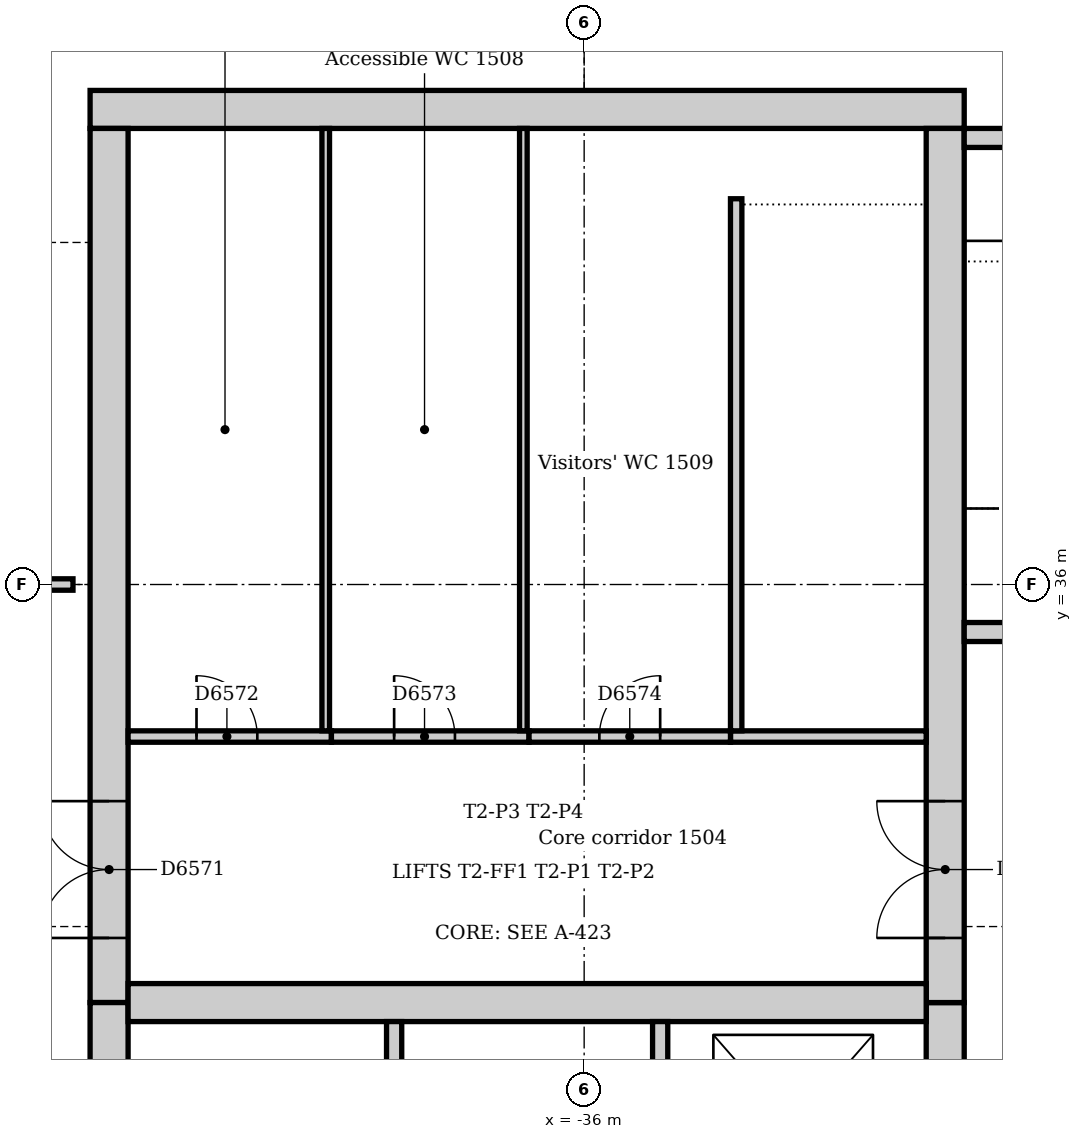
"""IFC4 building model, lengths in metres.
Left out: names, types, materials, properties, quantities, classifications, styles, units other than length and angle.
Written with IfcOpenShell. Run it as: python <this file> out.ifc"""

import sys

from ifc_helpers import new_model, si_unit, direction, frame, frame_2d, origin, place, context, subcontext, project, spatial, rectangle, extrude, element, fill, save


model = new_model("IFC4")
c1 = context("Model", 3, precision=1e-05, world=origin(), true_north=direction((0.0, 1.0)))
c2 = subcontext(c1, "Body", "Model", "MODEL_VIEW")
j1 = project(units=[si_unit("LENGTHUNIT", "METRE"), si_unit("PLANEANGLEUNIT", "RADIAN")], contexts=[c1])
p1 = place(None, origin())
s1 = spatial("IfcSite", under=j1, at=p1, CompositionType="ELEMENT")
p2 = place(p1, origin())
s2 = spatial("IfcBuilding", under=s1, at=p2, CompositionType="ELEMENT")
p3 = place(p2, frame((0.0, 0.0, 67.0)))
s3 = spatial("IfcBuildingStorey", under=s2, at=p3, CompositionType="ELEMENT", Elevation=67.0)
p4 = place(p3, frame((-31.0, 42.25, 0.0), z_axis=(0.0, 0.0, 1.0), x_axis=(-1.0, 0.0, 0.0)))
e1 = element("IfcWall", 1, at=p4, inside=s3, PredefinedType="SOLIDWALL", context=c2, shape_type="SweptSolid", body=[
    extrude(rectangle(XDim=11.5, YDim=0.5, at=frame_2d((5.75, 0.0))), origin(), (0.0, 0.0, 1.0), 4.0),
])
p5 = place(p3, frame((-31.25, 21.0, 0.0), z_axis=(0.0, 0.0, 1.0), x_axis=(0.0, 1.0, 0.0)))
e2 = element("IfcWall", 2, at=p5, inside=s3, PredefinedType="SOLIDWALL", context=c2, shape_type="SweptSolid", body=[
    extrude(rectangle(XDim=9.5, YDim=0.5, at=frame_2d((4.75, 0.0))), origin(), (0.0, 0.0, 1.0), 4.0),
])
p6 = place(p5, frame((5.25, 0.0, 0.0)))
e3 = element("IfcOpeningElement", 3, at=p6, cuts=e2, PredefinedType="OPENING", context=c2, shape_type="SweptSolid", body=[
    extrude(rectangle(XDim=1.0, YDim=2.1, at=frame_2d((0.5, 1.05))), frame((0.0, 0.26, 0.0), z_axis=(0.0, -1.0, 0.0), x_axis=(1.0, 0.0, 0.0)), (0.0, 0.0, 1.0), 0.52),
])
p7 = place(p3, frame((-31.25, 30.5, 0.0), z_axis=(0.0, 0.0, 1.0), x_axis=(0.0, 1.0, 0.0)))
e4 = element("IfcWall", 4, at=p7, inside=s3, PredefinedType="SOLIDWALL", context=c2, shape_type="SweptSolid", body=[
    extrude(rectangle(XDim=11.5, YDim=0.5, at=frame_2d((5.75, 0.0))), origin(), (0.0, 0.0, 1.0), 4.0),
])
p8 = place(p7, frame((0.85, 0.0, 0.0)))
e5 = element("IfcOpeningElement", 5, at=p8, cuts=e4, PredefinedType="OPENING", context=c2, shape_type="SweptSolid", body=[
    extrude(rectangle(XDim=1.8, YDim=2.1, at=frame_2d((0.9, 1.05))), frame((0.0, 0.26, 0.0), z_axis=(0.0, -1.0, 0.0), x_axis=(1.0, 0.0, 0.0)), (0.0, 0.0, 1.0), 0.52),
])
p9 = place(p3, frame((-42.25, 42.0, 0.0), z_axis=(0.0, 0.0, 1.0), x_axis=(0.0, -1.0, 0.0)))
e6 = element("IfcWall", 6, at=p9, inside=s3, PredefinedType="SOLIDWALL", context=c2, shape_type="SweptSolid", body=[
    extrude(rectangle(XDim=11.5, YDim=0.5, at=frame_2d((5.75, 0.0))), origin(), (0.0, 0.0, 1.0), 4.0),
])
p10 = place(p9, frame((8.85, 0.0, 0.0)))
e7 = element("IfcOpeningElement", 7, at=p10, cuts=e6, PredefinedType="OPENING", context=c2, shape_type="SweptSolid", body=[
    extrude(rectangle(XDim=1.8, YDim=2.1, at=frame_2d((0.9, 1.05))), frame((0.0, 0.26, 0.0), z_axis=(0.0, -1.0, 0.0), x_axis=(1.0, 0.0, 0.0)), (0.0, 0.0, 1.0), 0.52),
])
p11 = place(p3, frame((-42.25, 30.5, 0.0), z_axis=(0.0, 0.0, 1.0), x_axis=(0.0, -1.0, 0.0)))
e8 = element("IfcWall", 8, at=p11, inside=s3, PredefinedType="SOLIDWALL", context=c2, shape_type="SweptSolid", body=[
    extrude(rectangle(XDim=9.5, YDim=0.5, at=frame_2d((4.75, 0.0))), origin(), (0.0, 0.0, 1.0), 4.0),
])
p12 = place(p11, frame((3.85, 0.0, 0.0)))
e9 = element("IfcOpeningElement", 9, at=p12, cuts=e8, PredefinedType="OPENING", context=c2, shape_type="SweptSolid", body=[
    extrude(rectangle(XDim=1.8, YDim=2.1, at=frame_2d((0.9, 1.05))), frame((0.0, 0.26, 0.0), z_axis=(0.0, -1.0, 0.0), x_axis=(1.0, 0.0, 0.0)), (0.0, 0.0, 1.0), 0.52),
])
p13 = place(p3, frame((-42.0, 30.5, 0.0), z_axis=(0.0, 0.0, 1.0), x_axis=(1.0, 0.0, 0.0)))
e10 = element("IfcWall", 10, at=p13, inside=s3, PredefinedType="SOLIDWALL", context=c2, shape_type="SweptSolid", body=[
    extrude(rectangle(XDim=10.5, YDim=0.5, at=frame_2d((5.25, 0.0))), origin(), (0.0, 0.0, 1.0), 4.0),
])
p14 = place(p3, frame((-31.0, 35.375, 0.0), z_axis=(0.0, 0.0, 1.0), x_axis=(1.0, 0.0, 0.0)))
e11 = element("IfcWall", 11, at=p14, inside=s3, PredefinedType="SOLIDWALL", context=c2, shape_type="SweptSolid", body=[
    extrude(rectangle(XDim=3.64, YDim=0.25, at=frame_2d((1.82, 0.0))), origin(), (0.0, 0.0, 1.0), 4.0),
])
p15 = place(p14, frame((0.85, 0.0, 0.0)))
e12 = element("IfcOpeningElement", 12, at=p15, cuts=e11, PredefinedType="OPENING", context=c2, shape_type="SweptSolid", body=[
    extrude(rectangle(XDim=1.1, YDim=2.1, at=frame_2d((0.55, 1.05))), frame((0.0, 0.135, 0.0), z_axis=(0.0, -1.0, 0.0), x_axis=(1.0, 0.0, 0.0)), (0.0, 0.0, 1.0), 0.27),
])
p16 = place(p3, frame((-27.36, 41.875, 0.0), z_axis=(0.0, 0.0, 1.0), x_axis=(-1.0, 0.0, 0.0)))
e13 = element("IfcWall", 13, at=p16, inside=s3, PredefinedType="SOLIDWALL", context=c2, shape_type="SweptSolid", body=[
    extrude(rectangle(XDim=3.64, YDim=0.25, at=frame_2d((1.82, 0.0))), origin(), (0.0, 0.0, 1.0), 4.0),
])
for number, where, z_axis, x_axis in (
    (14, (-38.5, 27.4, 0.0), (0.0, 0.0, 1.0), (0.0, 1.0, 0.0)),
    (15, (-35.0, 27.4, 0.0), (0.0, 0.0, 1.0), (0.0, 1.0, 0.0)),
):
    element("IfcWall", number, at=place(p3, frame(where, z_axis=z_axis, x_axis=x_axis)), inside=s3, PredefinedType="SOLIDWALL", context=c2, shape_type="SweptSolid", body=[
        extrude(rectangle(XDim=2.85, YDim=0.2, at=frame_2d((1.425, 0.0))), origin(), (0.0, 0.0, 1.0), 4.0),
    ])
p17 = place(p3, frame((-34.075, 34.0, 0.0), z_axis=(0.0, 0.0, 1.0), x_axis=(1.0, 0.0, 0.0)))
e16 = element("IfcWall", 16, at=p17, inside=s3, PredefinedType="SOLIDWALL", context=c2, shape_type="SweptSolid", body=[
    extrude(rectangle(XDim=2.575, YDim=0.15, at=frame_2d((1.288, 0.0))), origin(), (0.0, 0.0, 1.0), 4.0),
])
p18 = place(p3, frame((-34.0, 41.075, 0.0), z_axis=(0.0, 0.0, 1.0), x_axis=(0.0, -1.0, 0.0)))
e17 = element("IfcWall", 17, at=p18, inside=s3, PredefinedType="SOLIDWALL", context=c2, shape_type="SweptSolid", body=[
    extrude(rectangle(XDim=7.0, YDim=0.15, at=frame_2d((3.5, 0.0))), origin(), (0.0, 0.0, 1.0), 4.0),
])
p19 = place(p3, frame((-39.325, 34.0, 0.0), z_axis=(0.0, 0.0, 1.0), x_axis=(-1.0, 0.0, 0.0)))
e18 = element("IfcWall", 18, at=p19, inside=s3, PredefinedType="PARTITIONING", context=c2, shape_type="SweptSolid", body=[
    extrude(rectangle(XDim=2.675, YDim=0.15, at=frame_2d((1.337, 0.0))), origin(), (0.0, 0.0, 1.0), 3.85),
])
p20 = place(p19, frame((0.975, 0.0, 0.0)))
e19 = element("IfcOpeningElement", 19, at=p20, cuts=e18, PredefinedType="OPENING", context=c2, shape_type="SweptSolid", body=[
    extrude(rectangle(XDim=0.8, YDim=2.1, at=frame_2d((0.4, 1.05))), frame((0.0, 0.085, 0.0), z_axis=(0.0, -1.0, 0.0), x_axis=(1.0, 0.0, 0.0)), (0.0, 0.0, 1.0), 0.17),
])
p21 = place(p3, frame((-36.725, 34.0, 0.0), z_axis=(0.0, 0.0, 1.0), x_axis=(-1.0, 0.0, 0.0)))
e20 = element("IfcWall", 20, at=p21, inside=s3, PredefinedType="PARTITIONING", context=c2, shape_type="SweptSolid", body=[
    extrude(rectangle(XDim=2.6, YDim=0.15, at=frame_2d((1.3, 0.0))), origin(), (0.0, 0.0, 1.0), 3.85),
])
p22 = place(p21, frame((0.975, 0.0, 0.0)))
e21 = element("IfcOpeningElement", 21, at=p22, cuts=e20, PredefinedType="OPENING", context=c2, shape_type="SweptSolid", body=[
    extrude(rectangle(XDim=0.8, YDim=2.1, at=frame_2d((0.4, 1.05))), frame((0.0, 0.085, 0.0), z_axis=(0.0, -1.0, 0.0), x_axis=(1.0, 0.0, 0.0)), (0.0, 0.0, 1.0), 0.17),
])
p23 = place(p3, frame((-34.075, 34.0, 0.0), z_axis=(0.0, 0.0, 1.0), x_axis=(-1.0, 0.0, 0.0)))
e22 = element("IfcWall", 22, at=p23, inside=s3, PredefinedType="PARTITIONING", context=c2, shape_type="SweptSolid", body=[
    extrude(rectangle(XDim=2.65, YDim=0.15, at=frame_2d((1.325, 0.0))), origin(), (0.0, 0.0, 1.0), 3.85),
])
p24 = place(p23, frame((0.925, 0.0, 0.0)))
e23 = element("IfcOpeningElement", 23, at=p24, cuts=e22, PredefinedType="OPENING", context=c2, shape_type="SweptSolid", body=[
    extrude(rectangle(XDim=0.8, YDim=2.1, at=frame_2d((0.4, 1.05))), frame((0.0, 0.085, 0.0), z_axis=(0.0, -1.0, 0.0), x_axis=(1.0, 0.0, 0.0)), (0.0, 0.0, 1.0), 0.17),
])
for number, where, z_axis, x_axis in (
    (24, (-39.4, 34.075, 0.0), (0.0, 0.0, 1.0), (0.0, 1.0, 0.0)),
    (25, (-36.8, 34.075, 0.0), (0.0, 0.0, 1.0), (0.0, 1.0, 0.0)),
):
    element("IfcWall", number, at=place(p3, frame(where, z_axis=z_axis, x_axis=x_axis)), inside=s3, PredefinedType="PARTITIONING", context=c2, shape_type="SweptSolid", body=[
        extrude(rectangle(XDim=7.925, YDim=0.1, at=frame_2d((3.962, 0.0))), origin(), (0.0, 0.0, 1.0), 3.85),
    ])
p25 = place(p3, frame((-44.65, 36.0, 0.0), z_axis=(0.0, 0.0, 1.0), x_axis=(1.0, 0.0, 0.0)))
e26 = element("IfcWall", 26, at=p25, inside=s3, PredefinedType="PARTITIONING", context=c2, shape_type="SweptSolid", body=[
    extrude(rectangle(XDim=1.925, YDim=0.15, at=frame_2d((0.963, 0.0))), origin(), (0.0, 0.0, 1.0), 3.602),
])
p26 = place(p25, frame((0.5, 0.0, 0.0)))
e27 = element("IfcOpeningElement", 27, at=p26, cuts=e26, PredefinedType="OPENING", context=c2, shape_type="SweptSolid", body=[
    extrude(rectangle(XDim=0.9, YDim=2.1, at=frame_2d((0.45, 1.05))), frame((0.0, 0.085, 0.0), z_axis=(0.0, -1.0, 0.0), x_axis=(1.0, 0.0, 0.0)), (0.0, 0.0, 1.0), 0.17),
])
p27 = place(p8, origin())
e28 = element("IfcDoor", 28, at=p27, inside=s3, OperationType="DOUBLE_DOOR_SINGLE_SWING", PredefinedType="DOOR", context=c2, shape_type="SweptSolid", body=[
    extrude(rectangle(XDim=1.8, YDim=2.1, at=frame_2d((0.9, 1.05))), frame((0.0, 0.025, 0.0), z_axis=(0.0, -1.0, 0.0), x_axis=(1.0, 0.0, 0.0)), (0.0, 0.0, 1.0), 0.05),
])
fill(e5, e28)
p28 = place(p10, frame((1.8, 0.0, 0.0), z_axis=(0.0, 0.0, 1.0), x_axis=(-1.0, 0.0, 0.0)))
e29 = element("IfcDoor", 29, at=p28, inside=s3, OperationType="DOUBLE_DOOR_SINGLE_SWING", PredefinedType="DOOR", context=c2, shape_type="SweptSolid", body=[
    extrude(rectangle(XDim=1.8, YDim=2.1, at=frame_2d((0.9, 1.05))), frame((0.0, 0.025, 0.0), z_axis=(0.0, -1.0, 0.0), x_axis=(1.0, 0.0, 0.0)), (0.0, 0.0, 1.0), 0.05),
])
fill(e7, e29)
p29 = place(p20, frame((0.8, 0.0, 0.0), z_axis=(0.0, 0.0, 1.0), x_axis=(-1.0, 0.0, 0.0)))
e30 = element("IfcDoor", 30, at=p29, inside=s3, OperationType="SINGLE_SWING_LEFT", PredefinedType="DOOR", context=c2, shape_type="SweptSolid", body=[
    extrude(rectangle(XDim=0.8, YDim=2.1, at=frame_2d((0.4, 1.05))), frame((0.0, 0.025, 0.0), z_axis=(0.0, -1.0, 0.0), x_axis=(1.0, 0.0, 0.0)), (0.0, 0.0, 1.0), 0.05),
])
fill(e19, e30)
p30 = place(p22, frame((0.8, 0.0, 0.0), z_axis=(0.0, 0.0, 1.0), x_axis=(-1.0, 0.0, 0.0)))
e31 = element("IfcDoor", 31, at=p30, inside=s3, OperationType="SINGLE_SWING_LEFT", PredefinedType="DOOR", context=c2, shape_type="SweptSolid", body=[
    extrude(rectangle(XDim=0.8, YDim=2.1, at=frame_2d((0.4, 1.05))), frame((0.0, 0.025, 0.0), z_axis=(0.0, -1.0, 0.0), x_axis=(1.0, 0.0, 0.0)), (0.0, 0.0, 1.0), 0.05),
])
fill(e21, e31)
p31 = place(p24, frame((0.8, 0.0, 0.0), z_axis=(0.0, 0.0, 1.0), x_axis=(-1.0, 0.0, 0.0)))
e32 = element("IfcDoor", 32, at=p31, inside=s3, OperationType="SINGLE_SWING_RIGHT", PredefinedType="DOOR", context=c2, shape_type="SweptSolid", body=[
    extrude(rectangle(XDim=0.8, YDim=2.1, at=frame_2d((0.4, 1.05))), frame((0.0, 0.025, 0.0), z_axis=(0.0, -1.0, 0.0), x_axis=(1.0, 0.0, 0.0)), (0.0, 0.0, 1.0), 0.05),
])
fill(e23, e32)
save(model, sys.argv[1])
